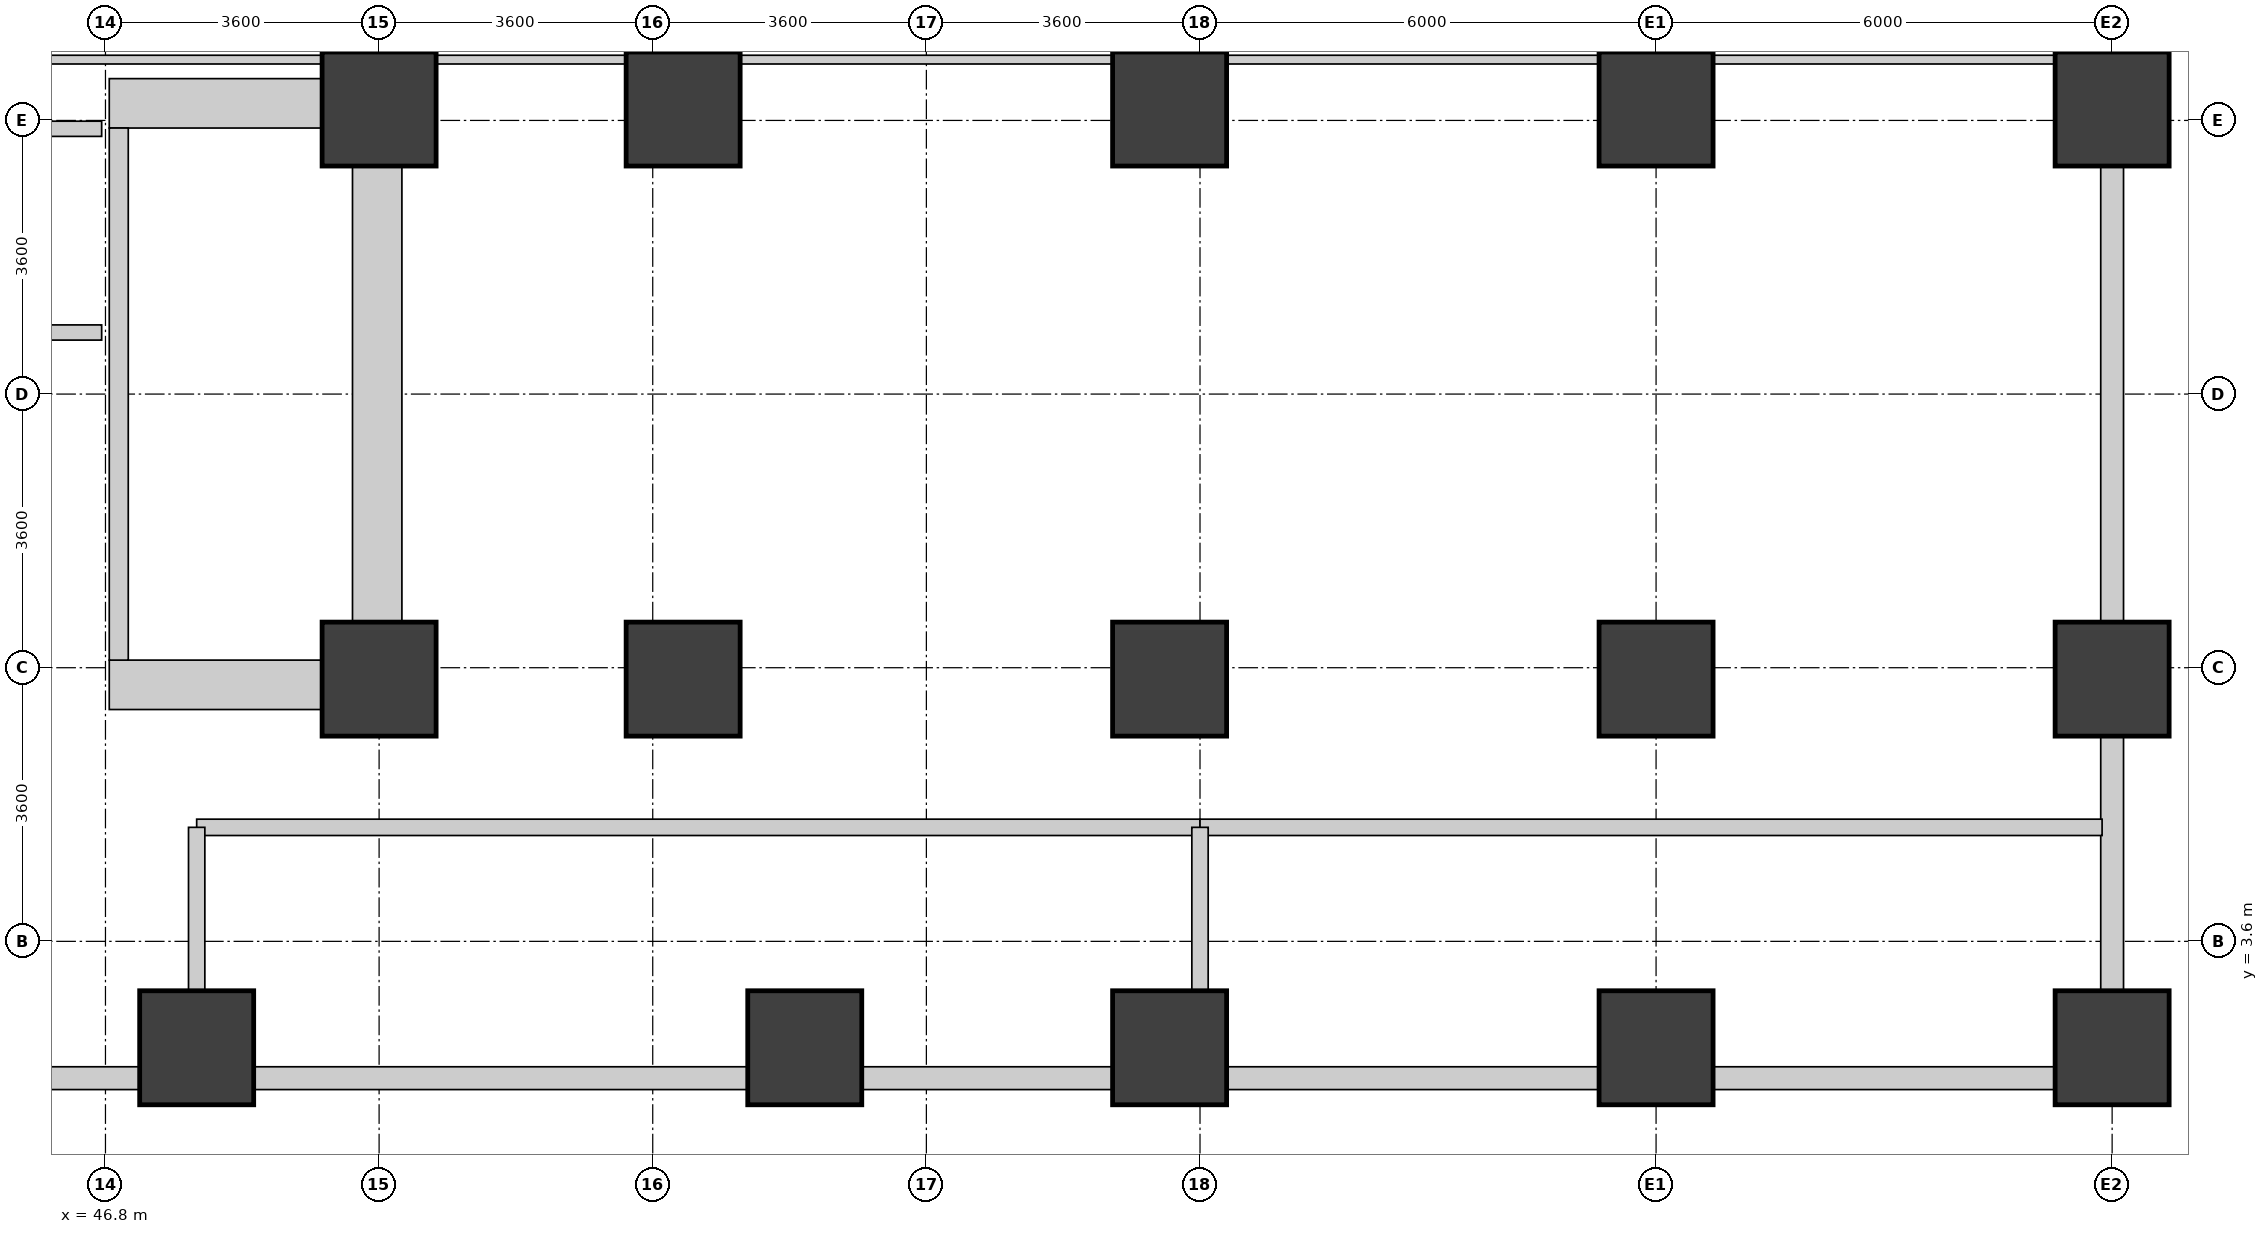
"""IFC4 building model, lengths in metres.
Left out: names, types, materials, properties, quantities, classifications, styles, units other than length and angle.
Written with IfcOpenShell. Run it as: python <this file> out.ifc"""

import sys

from ifc_helpers import new_model, si_unit, direction, frame, frame_2d, origin, origin_2d, place, context, subcontext, project, spatial, rectangle, extrude, source, transform, mapped, element, fill, save


model = new_model("IFC4")
c1 = context("Model", 3, precision=1e-05, world=origin(), true_north=direction((0.0, 1.0)))
c2 = subcontext(c1, "Body", "Model", "MODEL_VIEW")
j1 = project(units=[si_unit("LENGTHUNIT", "METRE"), si_unit("PLANEANGLEUNIT", "RADIAN")], contexts=[c1])
p1 = place(None, origin())
s1 = spatial("IfcSite", under=j1, at=p1, CompositionType="ELEMENT")
p2 = place(p1, origin())
s2 = spatial("IfcBuilding", under=s1, at=p2, CompositionType="ELEMENT")
p3 = place(p2, origin())
s3 = spatial("IfcBuildingStorey", under=s2, at=p3, CompositionType="ELEMENT", Elevation=0.0)
p4 = place(p3, frame((50.375, 6.65, 0.0), z_axis=(0.0, 0.0, 1.0), x_axis=(0.0, 1.0, 0.0)))
e1 = element("IfcWall", 1, at=p4, inside=s3, PredefinedType="SHEAR", context=c2, shape_type="SweptSolid", body=[
    extrude(rectangle(XDim=8.3, YDim=0.65, at=frame_2d((4.15, 0.0))), origin(), (0.0, 0.0, 1.0), 5.12),
])
for number, where, z_axis, x_axis in (
    (2, (46.85, 6.975, 0.0), (0.0, 0.0, 1.0), (1.0, 0.0, 0.0)),
    (3, (46.85, 14.625, 0.0), (0.0, 0.0, 1.0), (1.0, 0.0, 0.0)),
):
    element("IfcWall", number, at=place(p3, frame(where, z_axis=z_axis, x_axis=x_axis)), inside=s3, PredefinedType="SHEAR", context=c2, shape_type="SweptSolid", body=[
        extrude(rectangle(XDim=3.2, YDim=0.65, at=frame_2d((1.6, 0.0))), origin(), (0.0, 0.0, 1.0), 5.12),
    ])
p5 = place(p3, frame((46.975, 7.3, 0.0), z_axis=(0.0, 0.0, 1.0), x_axis=(0.0, 1.0, 0.0)))
e4 = element("IfcWall", 4, at=p5, inside=s3, PredefinedType="SHEAR", context=c2, shape_type="SweptSolid", body=[
    extrude(rectangle(XDim=7.0, YDim=0.25, at=frame_2d((3.5, 0.0))), origin(), (0.0, 0.0, 1.0), 5.12),
])
p6 = place(p5, frame((0.15, 0.0, 0.0)))
e5 = element("IfcOpeningElement", 5, at=p6, cuts=e4, PredefinedType="OPENING", context=c2, shape_type="SweptSolid", body=[
    extrude(rectangle(XDim=1.1, YDim=2.08, at=frame_2d((0.55, 1.04))), frame((0.0, 0.135, 0.0), z_axis=(0.0, -1.0, 0.0), x_axis=(1.0, 0.0, 0.0)), (0.0, 0.0, 1.0), 0.27),
])
m1 = source(origin(), c2, "Body", "SweptSolid", [
    extrude(rectangle(XDim=1.5, YDim=1.5, at=origin_2d()), origin(), (0.0, 0.0, 1.0), 5.4),
])
for number, where, z_axis, x_axis in (
    (6, (50.4, 7.05, 0.0), (0.0, 0.0, 1.0), (1.0, 0.0, 0.0)),
    (7, (50.4, 14.55, 0.0), (0.0, 0.0, 1.0), (1.0, 0.0, 0.0)),
    (8, (54.4, 7.05, 0.0), (0.0, 0.0, 1.0), (1.0, 0.0, 0.0)),
    (9, (54.4, 14.55, 0.0), (0.0, 0.0, 1.0), (1.0, 0.0, 0.0)),
    (10, (60.8, 14.55, 0.0), (0.0, 0.0, 1.0), (1.0, 0.0, 0.0)),
    (11, (60.8, 7.05, 0.0), (0.0, 0.0, 1.0), (1.0, 0.0, 0.0)),
    (12, (60.8, 2.2, 0.0), (0.0, 0.0, 1.0), (1.0, 0.0, 0.0)),
    (13, (56.0, 2.2, 0.0), (0.0, 0.0, 1.0), (1.0, 0.0, 0.0)),
    (14, (48.0, 2.2, 0.0), (0.0, 0.0, 1.0), (1.0, 0.0, 0.0)),
    (15, (67.2, 2.2, 0.0), (0.0, 0.0, 1.0), (1.0, 0.0, 0.0)),
    (16, (67.2, 7.05, 0.0), (0.0, 0.0, 1.0), (1.0, 0.0, 0.0)),
    (17, (67.2, 14.55, 0.0), (0.0, 0.0, 1.0), (1.0, 0.0, 0.0)),
    (18, (73.2, 2.2, 0.0), (0.0, 0.0, 1.0), (1.0, 0.0, 0.0)),
    (19, (73.2, 7.05, 0.0), (0.0, 0.0, 1.0), (1.0, 0.0, 0.0)),
    (20, (73.2, 14.55, 0.0), (0.0, 0.0, 1.0), (1.0, 0.0, 0.0)),
):
    element("IfcColumn", number, at=place(p3, frame(where, z_axis=z_axis, x_axis=x_axis)), inside=s3, PredefinedType="COLUMN", context=c2, shape_type="MappedRepresentation", body=[
        mapped(m1, transform((0.0, 0.0, 0.0), x_axis=(1.0, 0.0, 0.0), y_axis=(0.0, 1.0, 0.0), z_axis=(0.0, 0.0, 1.0), scale=1.0)),
    ])
p7 = place(p3, frame((47.249, 1.8, 0.0), z_axis=(0.0, 0.0, 1.0), x_axis=(-1.0, 0.0, 0.0)))
e21 = element("IfcWall", 21, at=p7, inside=s3, PredefinedType="STANDARD", context=c2, shape_type="SweptSolid", body=[
    extrude(rectangle(XDim=4.498, YDim=0.3, at=frame_2d((2.249, 0.0))), origin(), (0.0, 0.0, 1.0), 5.1),
])
p8 = place(p7, frame((1.049, 0.0, 0.9)))
e22 = element("IfcOpeningElement", 22, at=p8, cuts=e21, PredefinedType="OPENING", context=c2, shape_type="SweptSolid", body=[
    extrude(rectangle(XDim=2.4, YDim=2.5, at=frame_2d((1.2, 1.25))), frame((0.0, 0.16, 0.0), z_axis=(0.0, -1.0, 0.0), x_axis=(1.0, 0.0, 0.0)), (0.0, 0.0, 1.0), 0.32),
])
p9 = place(p3, frame((55.249, 1.8, 0.0), z_axis=(0.0, 0.0, 1.0), x_axis=(-1.0, 0.0, 0.0)))
e23 = element("IfcWall", 23, at=p9, inside=s3, PredefinedType="STANDARD", context=c2, shape_type="SweptSolid", body=[
    extrude(rectangle(XDim=6.498, YDim=0.3, at=frame_2d((3.249, 0.0))), origin(), (0.0, 0.0, 1.0), 5.1),
])
p10 = place(p9, frame((2.324, 0.0, 0.0)))
e24 = element("IfcOpeningElement", 24, at=p10, cuts=e23, PredefinedType="OPENING", context=c2, shape_type="SweptSolid", body=[
    extrude(rectangle(XDim=1.85, YDim=2.25, at=frame_2d((0.925, 1.125))), frame((0.0, 0.16, 0.0), z_axis=(0.0, -1.0, 0.0), x_axis=(1.0, 0.0, 0.0)), (0.0, 0.0, 1.0), 0.32),
])
p11 = place(p3, frame((60.049, 1.8, 0.0), z_axis=(0.0, 0.0, 1.0), x_axis=(-1.0, 0.0, 0.0)))
e25 = element("IfcWall", 25, at=p11, inside=s3, PredefinedType="STANDARD", context=c2, shape_type="SweptSolid", body=[
    extrude(rectangle(XDim=3.298, YDim=0.3, at=frame_2d((1.649, 0.0))), origin(), (0.0, 0.0, 1.0), 5.1),
])
p12 = place(p11, frame((0.449, 0.0, 0.9)))
e26 = element("IfcOpeningElement", 26, at=p12, cuts=e25, PredefinedType="OPENING", context=c2, shape_type="SweptSolid", body=[
    extrude(rectangle(XDim=2.4, YDim=2.5, at=frame_2d((1.2, 1.25))), frame((0.0, 0.16, 0.0), z_axis=(0.0, -1.0, 0.0), x_axis=(1.0, 0.0, 0.0)), (0.0, 0.0, 1.0), 0.32),
])
p13 = place(p3, frame((66.449, 1.8, 0.0), z_axis=(0.0, 0.0, 1.0), x_axis=(-1.0, 0.0, 0.0)))
e27 = element("IfcWall", 27, at=p13, inside=s3, PredefinedType="STANDARD", context=c2, shape_type="SweptSolid", body=[
    extrude(rectangle(XDim=4.898, YDim=0.3, at=frame_2d((2.449, 0.0))), origin(), (0.0, 0.0, 1.0), 5.1),
])
p14 = place(p13, frame((1.474, 0.0, 0.0)))
e28 = element("IfcOpeningElement", 28, at=p14, cuts=e27, PredefinedType="OPENING", context=c2, shape_type="SweptSolid", body=[
    extrude(rectangle(XDim=1.95, YDim=2.4, at=frame_2d((0.975, 1.2))), frame((0.0, 0.16, 0.0), z_axis=(0.0, -1.0, 0.0), x_axis=(1.0, 0.0, 0.0)), (0.0, 0.0, 1.0), 0.32),
])
p15 = place(p3, frame((72.449, 1.8, 0.0), z_axis=(0.0, 0.0, 1.0), x_axis=(-1.0, 0.0, 0.0)))
e29 = element("IfcWall", 29, at=p15, inside=s3, PredefinedType="STANDARD", context=c2, shape_type="SweptSolid", body=[
    extrude(rectangle(XDim=4.498, YDim=0.3, at=frame_2d((2.249, 0.0))), origin(), (0.0, 0.0, 1.0), 5.1),
])
p16 = place(p15, frame((1.049, 0.0, 0.9)))
e30 = element("IfcOpeningElement", 30, at=p16, cuts=e29, PredefinedType="OPENING", context=c2, shape_type="SweptSolid", body=[
    extrude(rectangle(XDim=2.4, YDim=2.5, at=frame_2d((1.2, 1.25))), frame((0.0, 0.16, 0.0), z_axis=(0.0, -1.0, 0.0), x_axis=(1.0, 0.0, 0.0)), (0.0, 0.0, 1.0), 0.32),
])
p17 = place(p3, frame((73.2, 6.299, 0.0), z_axis=(0.0, 0.0, 1.0), x_axis=(0.0, -1.0, 0.0)))
e31 = element("IfcWall", 31, at=p17, inside=s3, PredefinedType="STANDARD", context=c2, shape_type="SweptSolid", body=[
    extrude(rectangle(XDim=3.348, YDim=0.3, at=frame_2d((1.674, 0.0))), origin(), (0.0, 0.0, 1.0), 4.5),
])
p18 = place(p17, frame((2.029, 0.0, 0.9)))
e32 = element("IfcOpeningElement", 32, at=p18, cuts=e31, PredefinedType="OPENING", context=c2, shape_type="SweptSolid", body=[
    extrude(rectangle(XDim=0.95, YDim=1.75, at=frame_2d((0.475, 0.875))), frame((0.0, 0.16, 0.0), z_axis=(0.0, -1.0, 0.0), x_axis=(1.0, 0.0, 0.0)), (0.0, 0.0, 1.0), 0.32),
])
p19 = place(p3, frame((73.2, 13.799, 0.0), z_axis=(0.0, 0.0, 1.0), x_axis=(0.0, -1.0, 0.0)))
e33 = element("IfcWall", 33, at=p19, inside=s3, PredefinedType="STANDARD", context=c2, shape_type="SweptSolid", body=[
    extrude(rectangle(XDim=5.998, YDim=0.3, at=frame_2d((2.999, 0.0))), origin(), (0.0, 0.0, 1.0), 4.5),
])
p20 = place(p19, frame((2.074, 0.0, 0.0)))
e34 = element("IfcOpeningElement", 34, at=p20, cuts=e33, PredefinedType="OPENING", context=c2, shape_type="SweptSolid", body=[
    extrude(rectangle(XDim=1.85, YDim=2.25, at=frame_2d((0.925, 1.125))), frame((0.0, 0.16, 0.0), z_axis=(0.0, -1.0, 0.0), x_axis=(1.0, 0.0, 0.0)), (0.0, 0.0, 1.0), 0.32),
])
p21 = place(p3, frame((45.15, 11.61, 0.0), z_axis=(0.0, 0.0, 1.0), x_axis=(1.0, 0.0, 0.0)))
e35 = element("IfcWall", 35, at=p21, inside=s3, PredefinedType="PARTITIONING", context=c2, shape_type="SweptSolid", body=[
    extrude(rectangle(XDim=1.6, YDim=0.2, at=frame_2d((0.8, 0.0))), origin(), (0.0, 0.0, 1.0), 5.1),
])
p22 = place(p21, frame((0.25, 0.0, 0.0)))
e36 = element("IfcOpeningElement", 36, at=p22, cuts=e35, PredefinedType="OPENING", context=c2, shape_type="SweptSolid", body=[
    extrude(rectangle(XDim=1.1, YDim=2.12, at=frame_2d((0.55, 1.06))), frame((0.0, 0.11, 0.0), z_axis=(0.0, -1.0, 0.0), x_axis=(1.0, 0.0, 0.0)), (0.0, 0.0, 1.0), 0.22),
])
p23 = place(p3, frame((45.15, 14.29, 0.0), z_axis=(0.0, 0.0, 1.0), x_axis=(1.0, 0.0, 0.0)))
e37 = element("IfcWall", 37, at=p23, inside=s3, PredefinedType="PARTITIONING", context=c2, shape_type="SweptSolid", body=[
    extrude(rectangle(XDim=1.6, YDim=0.2, at=frame_2d((0.8, 0.0))), origin(), (0.0, 0.0, 1.0), 3.9),
])
p24 = place(p3, frame((48.0, 5.1, 0.0), z_axis=(0.0, 0.0, 1.0), x_axis=(1.0, 0.0, 0.0)))
e38 = element("IfcWall", 38, at=p24, inside=s3, PredefinedType="PARTITIONING", context=c2, shape_type="SweptSolid", body=[
    extrude(rectangle(XDim=13.2, YDim=0.215, at=frame_2d((6.6, 0.0))), origin(), (0.0, 0.0, 1.0), 5.1),
])
p25 = place(p24, frame((3.524, 0.0, 0.0)))
e39 = element("IfcOpeningElement", 39, at=p25, cuts=e38, PredefinedType="OPENING", context=c2, shape_type="SweptSolid", body=[
    extrude(rectangle(XDim=1.4, YDim=2.15, at=frame_2d((0.7, 1.075))), frame((0.0, 0.118, 0.0), z_axis=(0.0, -1.0, 0.0), x_axis=(1.0, 0.0, 0.0)), (0.0, 0.0, 1.0), 0.235),
])
p26 = place(p3, frame((61.2, 5.1, 0.0), z_axis=(0.0, 0.0, 1.0), x_axis=(1.0, 0.0, 0.0)))
e40 = element("IfcWall", 40, at=p26, inside=s3, PredefinedType="PARTITIONING", context=c2, shape_type="SweptSolid", body=[
    extrude(rectangle(XDim=11.868, YDim=0.215, at=frame_2d((5.934, 0.0))), origin(), (0.0, 0.0, 1.0), 5.1),
])
p27 = place(p26, frame((3.098, 0.0, 0.0)))
e41 = element("IfcOpeningElement", 41, at=p27, cuts=e40, PredefinedType="OPENING", context=c2, shape_type="SweptSolid", body=[
    extrude(rectangle(XDim=1.4, YDim=2.15, at=frame_2d((0.7, 1.075))), frame((0.0, 0.118, 0.0), z_axis=(0.0, -1.0, 0.0), x_axis=(1.0, 0.0, 0.0)), (0.0, 0.0, 1.0), 0.235),
])
p28 = place(p3, frame((48.0, 2.95, 0.0), z_axis=(0.0, 0.0, 1.0), x_axis=(0.0, 1.0, 0.0)))
e42 = element("IfcWall", 42, at=p28, inside=s3, PredefinedType="PARTITIONING", context=c2, shape_type="SweptSolid", body=[
    extrude(rectangle(XDim=2.15, YDim=0.215, at=frame_2d((1.075, 0.0))), origin(), (0.0, 0.0, 1.0), 5.1),
])
p29 = place(p3, frame((51.15, 15.2, 0.0), z_axis=(0.0, 0.0, 1.0), x_axis=(1.0, 0.0, 0.0)))
e43 = element("IfcWall", 43, at=p29, inside=s3, PredefinedType="PARTITIONING", context=c2, shape_type="SweptSolid", body=[
    extrude(rectangle(XDim=2.5, YDim=0.115, at=frame_2d((1.25, 0.0))), origin(), (0.0, 0.0, 1.0), 5.1),
])
p30 = place(p3, frame((55.15, 15.2, 0.0), z_axis=(0.0, 0.0, 1.0), x_axis=(1.0, 0.0, 0.0)))
e44 = element("IfcWall", 44, at=p30, inside=s3, PredefinedType="PARTITIONING", context=c2, shape_type="SweptSolid", body=[
    extrude(rectangle(XDim=4.9, YDim=0.115, at=frame_2d((2.45, 0.0))), origin(), (0.0, 0.0, 1.0), 5.1),
])
p31 = place(p3, frame((61.55, 15.2, 0.0), z_axis=(0.0, 0.0, 1.0), x_axis=(1.0, 0.0, 0.0)))
e45 = element("IfcWall", 45, at=p31, inside=s3, PredefinedType="PARTITIONING", context=c2, shape_type="SweptSolid", body=[
    extrude(rectangle(XDim=4.9, YDim=0.115, at=frame_2d((2.45, 0.0))), origin(), (0.0, 0.0, 1.0), 5.1),
])
p32 = place(p3, frame((67.95, 15.2, 0.0), z_axis=(0.0, 0.0, 1.0), x_axis=(1.0, 0.0, 0.0)))
e46 = element("IfcWall", 46, at=p32, inside=s3, PredefinedType="PARTITIONING", context=c2, shape_type="SweptSolid", body=[
    extrude(rectangle(XDim=4.5, YDim=0.115, at=frame_2d((2.25, 0.0))), origin(), (0.0, 0.0, 1.0), 5.1),
])
p33 = place(p3, frame((43.95, 15.2, 0.0), z_axis=(0.0, 0.0, 1.0), x_axis=(1.0, 0.0, 0.0)))
e47 = element("IfcWall", 47, at=p33, inside=s3, PredefinedType="PARTITIONING", context=c2, shape_type="SweptSolid", body=[
    extrude(rectangle(XDim=5.7, YDim=0.115, at=frame_2d((2.85, 0.0))), origin(), (0.0, 0.0, 1.0), 5.1),
])
p34 = place(p3, frame((50.4, 15.2, 0.0), z_axis=(0.0, 0.0, 1.0), x_axis=(0.0, 1.0, 0.0)))
e48 = element("IfcWall", 48, at=p34, inside=s3, PredefinedType="PARTITIONING", context=c2, shape_type="SweptSolid", body=[
    extrude(rectangle(XDim=11.24, YDim=0.165, at=frame_2d((5.62, 0.0))), origin(), (0.0, 0.0, 1.0), 4.5),
])
p35 = place(p3, frame((61.2, 1.932, 0.0), z_axis=(0.0, 0.0, 1.0), x_axis=(0.0, 1.0, 0.0)))
e49 = element("IfcWall", 49, at=p35, inside=s3, PredefinedType="PARTITIONING", context=c2, shape_type="SweptSolid", body=[
    extrude(rectangle(XDim=3.168, YDim=0.215, at=frame_2d((1.584, 0.0))), origin(), (0.0, 0.0, 1.0), 5.1),
])
p36 = place(p8, origin())
e50 = element("IfcWindow", 50, at=p36, inside=s3, PartitioningType="SINGLE_PANEL", PredefinedType="WINDOW", context=c2, shape_type="SweptSolid", body=[
    extrude(rectangle(XDim=2.4, YDim=2.5, at=frame_2d((1.2, 1.25))), frame((0.0, 0.03, 0.0), z_axis=(0.0, -1.0, 0.0), x_axis=(1.0, 0.0, 0.0)), (0.0, 0.0, 1.0), 0.06),
])
fill(e22, e50)
p37 = place(p10, origin())
e51 = element("IfcDoor", 51, at=p37, inside=s3, OperationType="DOUBLE_DOOR_SINGLE_SWING", PredefinedType="DOOR", context=c2, shape_type="SweptSolid", body=[
    extrude(rectangle(XDim=1.85, YDim=2.25, at=frame_2d((0.925, 1.125))), frame((0.0, 0.025, 0.0), z_axis=(0.0, -1.0, 0.0), x_axis=(1.0, 0.0, 0.0)), (0.0, 0.0, 1.0), 0.05),
])
fill(e24, e51)
p38 = place(p12, origin())
e52 = element("IfcWindow", 52, at=p38, inside=s3, PartitioningType="SINGLE_PANEL", PredefinedType="WINDOW", context=c2, shape_type="SweptSolid", body=[
    extrude(rectangle(XDim=2.4, YDim=2.5, at=frame_2d((1.2, 1.25))), frame((0.0, 0.03, 0.0), z_axis=(0.0, -1.0, 0.0), x_axis=(1.0, 0.0, 0.0)), (0.0, 0.0, 1.0), 0.06),
])
fill(e26, e52)
p39 = place(p14, origin())
e53 = element("IfcDoor", 53, at=p39, inside=s3, OperationType="DOUBLE_DOOR_SINGLE_SWING", PredefinedType="DOOR", context=c2, shape_type="SweptSolid", body=[
    extrude(rectangle(XDim=1.95, YDim=2.4, at=frame_2d((0.975, 1.2))), frame((0.0, 0.025, 0.0), z_axis=(0.0, -1.0, 0.0), x_axis=(1.0, 0.0, 0.0)), (0.0, 0.0, 1.0), 0.05),
])
fill(e28, e53)
p40 = place(p16, origin())
e54 = element("IfcWindow", 54, at=p40, inside=s3, PartitioningType="SINGLE_PANEL", PredefinedType="WINDOW", context=c2, shape_type="SweptSolid", body=[
    extrude(rectangle(XDim=2.4, YDim=2.5, at=frame_2d((1.2, 1.25))), frame((0.0, 0.03, 0.0), z_axis=(0.0, -1.0, 0.0), x_axis=(1.0, 0.0, 0.0)), (0.0, 0.0, 1.0), 0.06),
])
fill(e30, e54)
p41 = place(p18, origin())
e55 = element("IfcWindow", 55, at=p41, inside=s3, PartitioningType="SINGLE_PANEL", PredefinedType="WINDOW", context=c2, shape_type="SweptSolid", body=[
    extrude(rectangle(XDim=0.95, YDim=1.75, at=frame_2d((0.475, 0.875))), frame((0.0, 0.03, 0.0), z_axis=(0.0, -1.0, 0.0), x_axis=(1.0, 0.0, 0.0)), (0.0, 0.0, 1.0), 0.06),
])
fill(e32, e55)
p42 = place(p20, origin())
e56 = element("IfcDoor", 56, at=p42, inside=s3, OperationType="DOUBLE_DOOR_SINGLE_SWING", PredefinedType="DOOR", context=c2, shape_type="SweptSolid", body=[
    extrude(rectangle(XDim=1.85, YDim=2.25, at=frame_2d((0.925, 1.125))), frame((0.0, 0.025, 0.0), z_axis=(0.0, -1.0, 0.0), x_axis=(1.0, 0.0, 0.0)), (0.0, 0.0, 1.0), 0.05),
])
fill(e34, e56)
p43 = place(p6, origin())
e57 = element("IfcDoor", 57, at=p43, inside=s3, OperationType="SINGLE_SWING_LEFT", PredefinedType="DOOR", context=c2, shape_type="SweptSolid", body=[
    extrude(rectangle(XDim=1.1, YDim=2.08, at=frame_2d((0.55, 1.04))), frame((0.0, 0.025, 0.0), z_axis=(0.0, -1.0, 0.0), x_axis=(1.0, 0.0, 0.0)), (0.0, 0.0, 1.0), 0.05),
])
fill(e5, e57)
p44 = place(p22, origin())
e58 = element("IfcDoor", 58, at=p44, inside=s3, OperationType="SLIDING_TO_LEFT", PredefinedType="DOOR", context=c2, shape_type="SweptSolid", body=[
    extrude(rectangle(XDim=1.1, YDim=2.12, at=frame_2d((0.55, 1.06))), frame((0.0, 0.025, 0.0), z_axis=(0.0, -1.0, 0.0), x_axis=(1.0, 0.0, 0.0)), (0.0, 0.0, 1.0), 0.05),
])
fill(e36, e58)
p45 = place(p25, origin())
e59 = element("IfcDoor", 59, at=p45, inside=s3, OperationType="DOUBLE_DOOR_SINGLE_SWING", PredefinedType="DOOR", context=c2, shape_type="SweptSolid", body=[
    extrude(rectangle(XDim=1.4, YDim=2.15, at=frame_2d((0.7, 1.075))), frame((0.0, 0.025, 0.0), z_axis=(0.0, -1.0, 0.0), x_axis=(1.0, 0.0, 0.0)), (0.0, 0.0, 1.0), 0.05),
])
fill(e39, e59)
p46 = place(p27, origin())
e60 = element("IfcDoor", 60, at=p46, inside=s3, OperationType="DOUBLE_DOOR_SINGLE_SWING", PredefinedType="DOOR", context=c2, shape_type="SweptSolid", body=[
    extrude(rectangle(XDim=1.4, YDim=2.15, at=frame_2d((0.7, 1.075))), frame((0.0, 0.025, 0.0), z_axis=(0.0, -1.0, 0.0), x_axis=(1.0, 0.0, 0.0)), (0.0, 0.0, 1.0), 0.05),
])
fill(e41, e60)
save(model, sys.argv[1])
